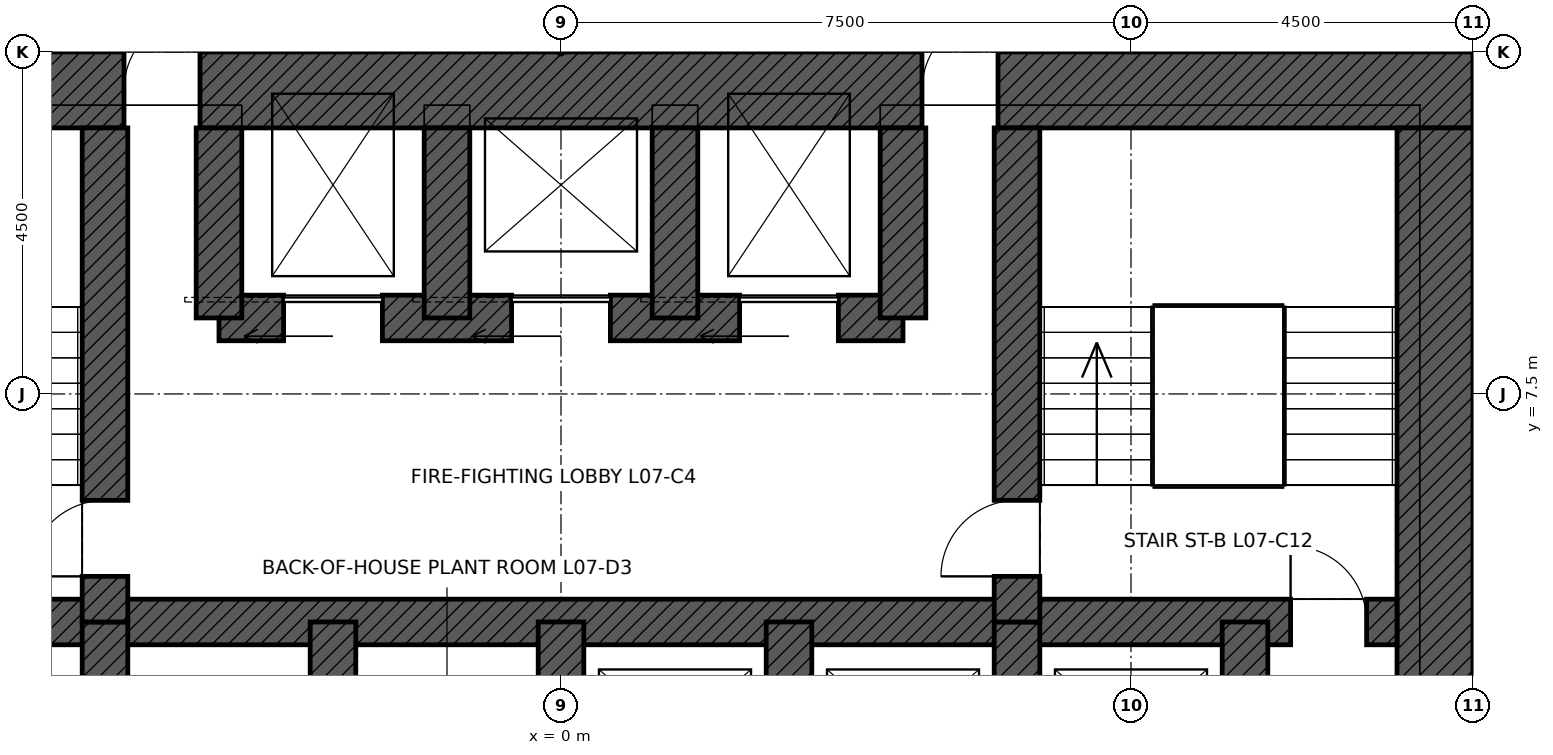
"""IFC4 building model, lengths in metres.
Left out: names, types, materials, properties, quantities, classifications, styles, units other than length and angle.
Written with IfcOpenShell. Run it as: python <this file> out.ifc"""

import sys

from ifc_helpers import new_model, si_unit, direction, frame, frame_2d, origin, place, context, subcontext, project, spatial, rectangle, extrude, element, fill, save


model = new_model("IFC4")
c1 = context("Model", 3, precision=1e-05, world=origin(), true_north=direction((0.0, 1.0)))
c2 = subcontext(c1, "Body", "Model", "MODEL_VIEW")
j1 = project(units=[si_unit("LENGTHUNIT", "METRE"), si_unit("PLANEANGLEUNIT", "RADIAN")], contexts=[c1])
p1 = place(None, origin())
s1 = spatial("IfcSite", under=j1, at=p1, CompositionType="ELEMENT")
p2 = place(p1, origin())
s2 = spatial("IfcBuilding", under=s1, at=p2, CompositionType="ELEMENT")
p3 = place(p2, frame((0.0, 0.0, 38.4)))
s3 = spatial("IfcBuildingStorey", under=s2, at=p3, CompositionType="ELEMENT", Elevation=38.4)
p4 = place(p3, frame((-12.0, 11.5, 0.0), z_axis=(0.0, 0.0, 1.0), x_axis=(1.0, 0.0, 0.0)))
e1 = element("IfcWall", 1, at=p4, inside=s3, PredefinedType="SHEAR", context=c2, shape_type="SweptSolid", body=[
    extrude(rectangle(XDim=24.0, YDim=1.0, at=frame_2d((12.0, 0.0))), origin(), (0.0, 0.0, 1.0), 5.0),
])
p5 = place(p4, frame((6.25, 0.0, 0.0)))
e2 = element("IfcOpeningElement", 2, at=p5, cuts=e1, PredefinedType="OPENING", context=c2, shape_type="SweptSolid", body=[
    extrude(rectangle(XDim=1.0, YDim=2.4, at=frame_2d((0.5, 1.2))), frame((0.0, 0.51, 0.0), z_axis=(0.0, -1.0, 0.0), x_axis=(1.0, 0.0, 0.0)), (0.0, 0.0, 1.0), 1.02),
])
p6 = place(p4, frame((16.75, 0.0, 0.0)))
e3 = element("IfcOpeningElement", 3, at=p6, cuts=e1, PredefinedType="OPENING", context=c2, shape_type="SweptSolid", body=[
    extrude(rectangle(XDim=1.0, YDim=2.4, at=frame_2d((0.5, 1.2))), frame((0.0, 0.51, 0.0), z_axis=(0.0, -1.0, 0.0), x_axis=(1.0, 0.0, 0.0)), (0.0, 0.0, 1.0), 1.02),
])
p7 = place(p3, frame((11.5, 11.0, 0.0), z_axis=(0.0, 0.0, 1.0), x_axis=(0.0, -1.0, 0.0)))
e4 = element("IfcWall", 4, at=p7, inside=s3, PredefinedType="SHEAR", context=c2, shape_type="SweptSolid", body=[
    extrude(rectangle(XDim=22.0, YDim=1.0, at=frame_2d((11.0, 0.0))), origin(), (0.0, 0.0, 1.0), 5.0),
])
p8 = place(p7, frame((10.5, 0.0, 0.0)))
e5 = element("IfcOpeningElement", 5, at=p8, cuts=e4, PredefinedType="OPENING", context=c2, shape_type="SweptSolid", body=[
    extrude(rectangle(XDim=1.0, YDim=2.4, at=frame_2d((0.5, 1.2))), frame((0.0, 0.51, 0.0), z_axis=(0.0, -1.0, 0.0), x_axis=(1.0, 0.0, 0.0)), (0.0, 0.0, 1.0), 1.02),
])
p9 = place(p3, frame((-11.0, 4.5, 0.0), z_axis=(0.0, 0.0, 1.0), x_axis=(1.0, 0.0, 0.0)))
e6 = element("IfcWall", 6, at=p9, inside=s3, PredefinedType="SHEAR", context=c2, shape_type="SweptSolid", body=[
    extrude(rectangle(XDim=22.0, YDim=0.6, at=frame_2d((11.0, 0.0))), origin(), (0.0, 0.0, 1.0), 5.0),
])
p10 = place(p9, frame((0.4, 0.0, 0.0)))
e7 = element("IfcOpeningElement", 7, at=p10, cuts=e6, PredefinedType="OPENING", context=c2, shape_type="SweptSolid", body=[
    extrude(rectangle(XDim=1.0, YDim=2.1, at=frame_2d((0.5, 1.05))), frame((0.0, 0.31, 0.0), z_axis=(0.0, -1.0, 0.0), x_axis=(1.0, 0.0, 0.0)), (0.0, 0.0, 1.0), 0.62),
])
p11 = place(p9, frame((20.6, 0.0, 0.0)))
e8 = element("IfcOpeningElement", 8, at=p11, cuts=e6, PredefinedType="OPENING", context=c2, shape_type="SweptSolid", body=[
    extrude(rectangle(XDim=1.0, YDim=2.1, at=frame_2d((0.5, 1.05))), frame((0.0, 0.31, 0.0), z_axis=(0.0, -1.0, 0.0), x_axis=(1.0, 0.0, 0.0)), (0.0, 0.0, 1.0), 0.62),
])
p12 = place(p3, frame((-4.5, 8.5, 0.0), z_axis=(0.0, 0.0, 1.0), x_axis=(1.0, 0.0, 0.0)))
e9 = element("IfcWall", 9, at=p12, inside=s3, PredefinedType="SHEAR", context=c2, shape_type="SweptSolid", body=[
    extrude(rectangle(XDim=9.0, YDim=0.6, at=frame_2d((4.5, 0.0))), origin(), (0.0, 0.0, 1.0), 5.0),
])
p13 = place(p12, frame((0.85, 0.0, 0.0)))
e10 = element("IfcOpeningElement", 10, at=p13, cuts=e9, PredefinedType="OPENING", context=c2, shape_type="SweptSolid", body=[
    extrude(rectangle(XDim=1.3, YDim=2.4, at=frame_2d((0.65, 1.2))), frame((0.0, 0.31, 0.0), z_axis=(0.0, -1.0, 0.0), x_axis=(1.0, 0.0, 0.0)), (0.0, 0.0, 1.0), 0.62),
])
p14 = place(p12, frame((6.85, 0.0, 0.0)))
e11 = element("IfcOpeningElement", 11, at=p14, cuts=e9, PredefinedType="OPENING", context=c2, shape_type="SweptSolid", body=[
    extrude(rectangle(XDim=1.3, YDim=2.4, at=frame_2d((0.65, 1.2))), frame((0.0, 0.31, 0.0), z_axis=(0.0, -1.0, 0.0), x_axis=(1.0, 0.0, 0.0)), (0.0, 0.0, 1.0), 0.62),
])
p15 = place(p12, frame((3.85, 0.0, 0.0)))
e12 = element("IfcOpeningElement", 12, at=p15, cuts=e9, PredefinedType="OPENING", context=c2, shape_type="SweptSolid", body=[
    extrude(rectangle(XDim=1.3, YDim=2.4, at=frame_2d((0.65, 1.2))), frame((0.0, 0.31, 0.0), z_axis=(0.0, -1.0, 0.0), x_axis=(1.0, 0.0, 0.0)), (0.0, 0.0, 1.0), 0.62),
])
for number, where, z_axis, x_axis in (
    (13, (9.0, 1.5, 0.0), (0.0, 0.0, 1.0), (0.0, 1.0, 0.0)),
    (14, (-6.0, 1.5, 0.0), (0.0, 0.0, 1.0), (0.0, 1.0, 0.0)),
    (15, (-3.0, 1.5, 0.0), (0.0, 0.0, 1.0), (0.0, 1.0, 0.0)),
    (16, (0.0, 1.5, 0.0), (0.0, 0.0, 1.0), (0.0, 1.0, 0.0)),
    (17, (3.0, 1.5, 0.0), (0.0, 0.0, 1.0), (0.0, 1.0, 0.0)),
    (18, (6.0, 1.5, 0.0), (0.0, 0.0, 1.0), (0.0, 1.0, 0.0)),
):
    element("IfcWall", number, at=place(p3, frame(where, z_axis=z_axis, x_axis=x_axis)), inside=s3, PredefinedType="SHEAR", context=c2, shape_type="SweptSolid", body=[
        extrude(rectangle(XDim=3.0, YDim=0.6, at=frame_2d((1.5, 0.0))), origin(), (0.0, 0.0, 1.0), 5.0),
    ])
p16 = place(p3, frame((-6.0, 4.5, 0.0), z_axis=(0.0, 0.0, 1.0), x_axis=(0.0, 1.0, 0.0)))
e19 = element("IfcWall", 19, at=p16, inside=s3, PredefinedType="SHEAR", context=c2, shape_type="SweptSolid", body=[
    extrude(rectangle(XDim=6.5, YDim=0.6, at=frame_2d((3.25, 0.0))), origin(), (0.0, 0.0, 1.0), 5.0),
])
p17 = place(p16, frame((0.6, 0.0, 0.0)))
e20 = element("IfcOpeningElement", 20, at=p17, cuts=e19, PredefinedType="OPENING", context=c2, shape_type="SweptSolid", body=[
    extrude(rectangle(XDim=1.0, YDim=2.1, at=frame_2d((0.5, 1.05))), frame((0.0, 0.31, 0.0), z_axis=(0.0, -1.0, 0.0), x_axis=(1.0, 0.0, 0.0)), (0.0, 0.0, 1.0), 0.62),
])
p18 = place(p3, frame((6.0, 4.5, 0.0), z_axis=(0.0, 0.0, 1.0), x_axis=(0.0, 1.0, 0.0)))
e21 = element("IfcWall", 21, at=p18, inside=s3, PredefinedType="SHEAR", context=c2, shape_type="SweptSolid", body=[
    extrude(rectangle(XDim=6.5, YDim=0.6, at=frame_2d((3.25, 0.0))), origin(), (0.0, 0.0, 1.0), 5.0),
])
p19 = place(p18, frame((0.6, 0.0, 0.0)))
e22 = element("IfcOpeningElement", 22, at=p19, cuts=e21, PredefinedType="OPENING", context=c2, shape_type="SweptSolid", body=[
    extrude(rectangle(XDim=1.0, YDim=2.1, at=frame_2d((0.5, 1.05))), frame((0.0, 0.31, 0.0), z_axis=(0.0, -1.0, 0.0), x_axis=(1.0, 0.0, 0.0)), (0.0, 0.0, 1.0), 0.62),
])
for number, where, z_axis, x_axis in (
    (23, (-4.5, 8.5, 0.0), (0.0, 0.0, 1.0), (0.0, 1.0, 0.0)),
    (24, (4.5, 8.5, 0.0), (0.0, 0.0, 1.0), (0.0, 1.0, 0.0)),
    (25, (-1.5, 8.5, 0.0), (0.0, 0.0, 1.0), (0.0, 1.0, 0.0)),
    (26, (1.5, 8.5, 0.0), (0.0, 0.0, 1.0), (0.0, 1.0, 0.0)),
):
    element("IfcWall", number, at=place(p3, frame(where, z_axis=z_axis, x_axis=x_axis)), inside=s3, PredefinedType="SHEAR", context=c2, shape_type="SweptSolid", body=[
        extrude(rectangle(XDim=2.5, YDim=0.6, at=frame_2d((1.25, 0.0))), origin(), (0.0, 0.0, 1.0), 5.0),
    ])
p20 = place(p11, origin())
e27 = element("IfcDoor", 27, at=p20, inside=s3, OperationType="SINGLE_SWING_LEFT", PredefinedType="DOOR", context=c2, shape_type="SweptSolid", body=[
    extrude(rectangle(XDim=1.0, YDim=2.1, at=frame_2d((0.5, 1.05))), frame((0.0, 0.025, 0.0), z_axis=(0.0, -1.0, 0.0), x_axis=(1.0, 0.0, 0.0)), (0.0, 0.0, 1.0), 0.05),
])
fill(e8, e27)
p21 = place(p17, origin())
e28 = element("IfcDoor", 28, at=p21, inside=s3, OperationType="SINGLE_SWING_LEFT", PredefinedType="DOOR", context=c2, shape_type="SweptSolid", body=[
    extrude(rectangle(XDim=1.0, YDim=2.1, at=frame_2d((0.5, 1.05))), frame((0.0, 0.025, 0.0), z_axis=(0.0, -1.0, 0.0), x_axis=(1.0, 0.0, 0.0)), (0.0, 0.0, 1.0), 0.05),
])
fill(e20, e28)
p22 = place(p19, origin())
e29 = element("IfcDoor", 29, at=p22, inside=s3, OperationType="SINGLE_SWING_LEFT", PredefinedType="DOOR", context=c2, shape_type="SweptSolid", body=[
    extrude(rectangle(XDim=1.0, YDim=2.1, at=frame_2d((0.5, 1.05))), frame((0.0, 0.025, 0.0), z_axis=(0.0, -1.0, 0.0), x_axis=(1.0, 0.0, 0.0)), (0.0, 0.0, 1.0), 0.05),
])
fill(e22, e29)
p23 = place(p5, origin())
e30 = element("IfcDoor", 30, at=p23, inside=s3, OperationType="SINGLE_SWING_RIGHT", PredefinedType="DOOR", context=c2, shape_type="SweptSolid", body=[
    extrude(rectangle(XDim=1.0, YDim=2.4, at=frame_2d((0.5, 1.2))), frame((0.0, 0.485, 0.0), z_axis=(0.0, -1.0, 0.0), x_axis=(1.0, 0.0, 0.0)), (0.0, 0.0, 1.0), 0.05),
])
fill(e2, e30)
p24 = place(p6, origin())
e31 = element("IfcDoor", 31, at=p24, inside=s3, OperationType="SINGLE_SWING_RIGHT", PredefinedType="DOOR", context=c2, shape_type="SweptSolid", body=[
    extrude(rectangle(XDim=1.0, YDim=2.4, at=frame_2d((0.5, 1.2))), frame((0.0, 0.485, 0.0), z_axis=(0.0, -1.0, 0.0), x_axis=(1.0, 0.0, 0.0)), (0.0, 0.0, 1.0), 0.05),
])
fill(e3, e31)
p25 = place(p13, origin())
e32 = element("IfcDoor", 32, at=p25, inside=s3, OperationType="SLIDING_TO_LEFT", PredefinedType="DOOR", context=c2, shape_type="SweptSolid", body=[
    extrude(rectangle(XDim=1.3, YDim=2.4, at=frame_2d((0.65, 1.2))), frame((0.0, 0.025, 0.0), z_axis=(0.0, -1.0, 0.0), x_axis=(1.0, 0.0, 0.0)), (0.0, 0.0, 1.0), 0.05),
])
fill(e10, e32)
p26 = place(p14, origin())
e33 = element("IfcDoor", 33, at=p26, inside=s3, OperationType="SLIDING_TO_LEFT", PredefinedType="DOOR", context=c2, shape_type="SweptSolid", body=[
    extrude(rectangle(XDim=1.3, YDim=2.4, at=frame_2d((0.65, 1.2))), frame((0.0, 0.025, 0.0), z_axis=(0.0, -1.0, 0.0), x_axis=(1.0, 0.0, 0.0)), (0.0, 0.0, 1.0), 0.05),
])
fill(e11, e33)
p27 = place(p15, origin())
e34 = element("IfcDoor", 34, at=p27, inside=s3, OperationType="SLIDING_TO_LEFT", PredefinedType="DOOR", context=c2, shape_type="SweptSolid", body=[
    extrude(rectangle(XDim=1.3, YDim=2.4, at=frame_2d((0.65, 1.2))), frame((0.0, 0.025, 0.0), z_axis=(0.0, -1.0, 0.0), x_axis=(1.0, 0.0, 0.0)), (0.0, 0.0, 1.0), 0.05),
])
fill(e12, e34)
save(model, sys.argv[1])
